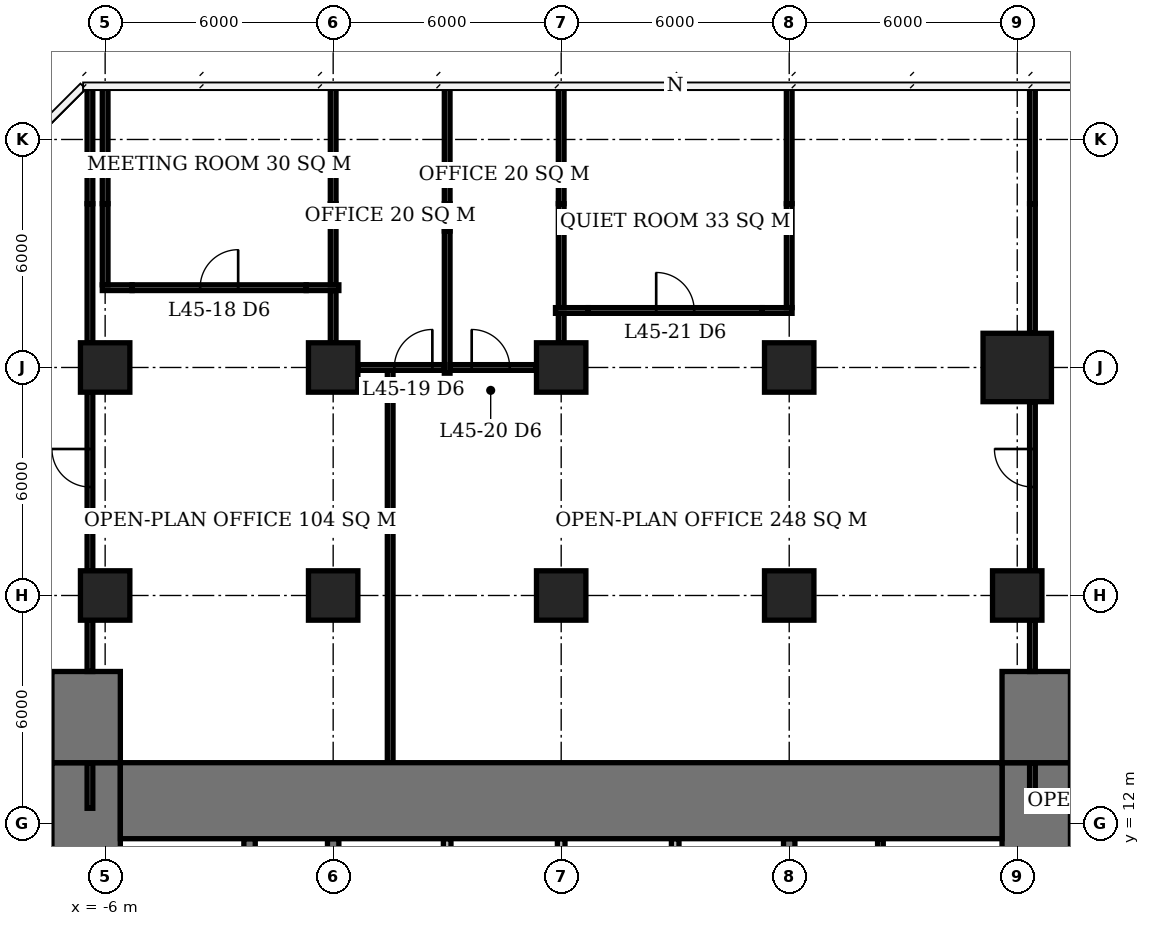
"""IFC4 building model, lengths in metres.
Left out: names, types, materials, properties, quantities, classifications, styles, units other than length and angle.
Written with IfcOpenShell. Run it as: python <this file> out.ifc"""

import sys

from ifc_helpers import new_model, si_unit, direction, frame, frame_2d, origin, origin_2d, place, context, subcontext, project, spatial, rectangle, extrude, element, fill, save


model = new_model("IFC4")
c1 = context("Model", 3, precision=1e-05, world=origin(), true_north=direction((0.0, 1.0)))
c2 = subcontext(c1, "Body", "Model", "MODEL_VIEW")
j1 = project(units=[si_unit("LENGTHUNIT", "METRE"), si_unit("PLANEANGLEUNIT", "RADIAN")], contexts=[c1])
p1 = place(None, origin())
s1 = spatial("IfcSite", under=j1, at=p1, CompositionType="ELEMENT")
p2 = place(p1, origin())
s2 = spatial("IfcBuilding", under=s1, at=p2, CompositionType="ELEMENT")
p3 = place(p2, frame((0.0, 0.0, 185.0)))
s3 = spatial("IfcBuildingStorey", under=s2, at=p3, CompositionType="ELEMENT", Elevation=185.0)
for number, where, z_axis, x_axis in (
    (1, (-6.0, 18.0, 0.0), (0.0, 0.0, 1.0), (1.0, 0.0, 0.0)),
    (2, (-6.0, 24.0, 0.0), (0.0, 0.0, 1.0), (1.0, 0.0, 0.0)),
    (3, (0.0, 18.0, 0.0), (0.0, 0.0, 1.0), (1.0, 0.0, 0.0)),
    (4, (0.0, 24.0, 0.0), (0.0, 0.0, 1.0), (1.0, 0.0, 0.0)),
    (5, (6.0, 18.0, 0.0), (0.0, 0.0, 1.0), (1.0, 0.0, 0.0)),
    (6, (6.0, 24.0, 0.0), (0.0, 0.0, 1.0), (1.0, 0.0, 0.0)),
    (7, (12.0, 18.0, 0.0), (0.0, 0.0, 1.0), (1.0, 0.0, 0.0)),
    (8, (12.0, 24.0, 0.0), (0.0, 0.0, 1.0), (1.0, 0.0, 0.0)),
    (9, (18.0, 18.0, 0.0), (0.0, 0.0, 1.0), (1.0, 0.0, 0.0)),
):
    element("IfcColumn", number, at=place(p3, frame(where, z_axis=z_axis, x_axis=x_axis)), inside=s3, PredefinedType="COLUMN", context=c2, shape_type="SweptSolid", body=[
        extrude(rectangle(XDim=1.3, YDim=1.3, at=origin_2d()), origin(), (0.0, 0.0, 1.0), 3.9),
    ])
p4 = place(p3, frame((18.0, 24.0, 0.0), z_axis=(0.0, 0.0, 1.0), x_axis=(1.0, 0.0, 0.0)))
e10 = element("IfcColumn", 10, at=p4, inside=s3, PredefinedType="COLUMN", context=c2, shape_type="SweptSolid", body=[
    extrude(rectangle(XDim=1.8, YDim=1.8, at=origin_2d()), origin(), (0.0, 0.0, 1.0), 3.9),
])
p5 = place(p3, frame((-5.6, 12.6, 0.0), z_axis=(0.0, 0.0, 1.0), x_axis=(1.0, 0.0, 0.0)))
e11 = element("IfcWall", 11, at=p5, inside=s3, PredefinedType="SHEAR", context=c2, shape_type="SweptSolid", body=[
    extrude(rectangle(XDim=23.2, YDim=2.0, at=frame_2d((11.6, 0.0))), origin(), (0.0, 0.0, 1.0), 3.9),
])
p6 = place(p3, frame((-6.5, -7.6, 0.0), z_axis=(0.0, 0.0, 1.0), x_axis=(0.0, 1.0, 0.0)))
e12 = element("IfcWall", 12, at=p6, inside=s3, PredefinedType="SHEAR", context=c2, shape_type="SweptSolid", body=[
    extrude(rectangle(XDim=21.2, YDim=1.8, at=frame_2d((10.6, 0.0))), origin(), (0.0, 0.0, 1.0), 3.9),
])
p7 = place(p6, frame((7.8, 0.0, 0.0)))
e13 = element("IfcOpeningElement", 13, at=p7, cuts=e12, PredefinedType="OPENING", context=c2, shape_type="SweptSolid", body=[
    extrude(rectangle(XDim=1.8, YDim=2.4, at=frame_2d((0.9, 1.2))), frame((0.0, 0.91, 0.0), z_axis=(0.0, -1.0, 0.0), x_axis=(1.0, 0.0, 0.0)), (0.0, 0.0, 1.0), 1.82),
])
p8 = place(p3, frame((18.5, -7.6, 0.0), z_axis=(0.0, 0.0, 1.0), x_axis=(0.0, 1.0, 0.0)))
e14 = element("IfcWall", 14, at=p8, inside=s3, PredefinedType="SHEAR", context=c2, shape_type="SweptSolid", body=[
    extrude(rectangle(XDim=21.2, YDim=1.8, at=frame_2d((10.6, 0.0))), origin(), (0.0, 0.0, 1.0), 3.9),
])
p9 = place(p8, frame((9.2, 0.0, 0.0)))
e15 = element("IfcOpeningElement", 15, at=p9, cuts=e14, PredefinedType="OPENING", context=c2, shape_type="SweptSolid", body=[
    extrude(rectangle(XDim=1.8, YDim=2.4, at=frame_2d((0.9, 1.2))), frame((0.0, 0.91, 0.0), z_axis=(0.0, -1.0, 0.0), x_axis=(1.0, 0.0, 0.0)), (0.0, 0.0, 1.0), 1.82),
])
for number, where, z_axis, x_axis in (
    (16, (-6.5, 13.6, 0.0), (0.0, 0.0, 1.0), (0.0, 1.0, 0.0)),
    (17, (18.5, 13.6, 0.0), (0.0, 0.0, 1.0), (0.0, 1.0, 0.0)),
):
    element("IfcWall", number, at=place(p3, frame(where, z_axis=z_axis, x_axis=x_axis)), inside=s3, PredefinedType="SHEAR", context=c2, shape_type="SweptSolid", body=[
        extrude(rectangle(XDim=2.4, YDim=1.8, at=frame_2d((1.2, 0.0))), origin(), (0.0, 0.0, 1.0), 3.9),
    ])
p10 = place(p3, frame((0.0, 3.15, 0.0), z_axis=(0.0, 0.0, 1.0), x_axis=(0.0, 1.0, 0.0)))
e18 = element("IfcWall", 18, at=p10, inside=s3, PredefinedType="SHEAR", context=c2, shape_type="SweptSolid", body=[
    extrude(rectangle(XDim=8.45, YDim=0.3, at=frame_2d((4.225, 0.0))), origin(), (0.0, 0.0, 1.0), 3.9),
])
p11 = place(p3, frame((12.0, 6.15, 0.0), z_axis=(0.0, 0.0, 1.0), x_axis=(0.0, 1.0, 0.0)))
e19 = element("IfcWall", 19, at=p11, inside=s3, PredefinedType="SHEAR", context=c2, shape_type="SweptSolid", body=[
    extrude(rectangle(XDim=5.45, YDim=0.3, at=frame_2d((2.725, 0.0))), origin(), (0.0, 0.0, 1.0), 3.9),
])
p12 = place(p3, frame((-2.2, 3.15, 0.0), z_axis=(0.0, 0.0, 1.0), x_axis=(0.0, 1.0, 0.0)))
e20 = element("IfcWall", 20, at=p12, inside=s3, PredefinedType="SHEAR", context=c2, shape_type="SweptSolid", body=[
    extrude(rectangle(XDim=8.45, YDim=0.3, at=frame_2d((4.225, 0.0))), origin(), (0.0, 0.0, 1.0), 3.9),
])
for number, where, z_axis, x_axis in (
    (21, (3.0, 6.15, 0.0), (0.0, 0.0, 1.0), (0.0, 1.0, 0.0)),
    (22, (6.0, 6.15, 0.0), (0.0, 0.0, 1.0), (0.0, 1.0, 0.0)),
    (23, (9.0, 6.15, 0.0), (0.0, 0.0, 1.0), (0.0, 1.0, 0.0)),
):
    element("IfcWall", number, at=place(p3, frame(where, z_axis=z_axis, x_axis=x_axis)), inside=s3, PredefinedType="SOLIDWALL", context=c2, shape_type="SweptSolid", body=[
        extrude(rectangle(XDim=5.45, YDim=0.2, at=frame_2d((2.725, 0.0))), origin(), (0.0, 0.0, 1.0), 3.9),
    ])
p13 = place(p3, frame((14.4, 6.15, 0.0), z_axis=(0.0, 0.0, 1.0), x_axis=(0.0, 1.0, 0.0)))
e24 = element("IfcWall", 24, at=p13, inside=s3, PredefinedType="PLUMBINGWALL", context=c2, shape_type="SweptSolid", body=[
    extrude(rectangle(XDim=5.45, YDim=0.15, at=frame_2d((2.725, 0.0))), origin(), (0.0, 0.0, 1.0), 3.65),
])
p14 = place(p3, frame((0.66, 24.0, 0.0), z_axis=(0.0, 0.0, 1.0), x_axis=(1.0, 0.0, 0.0)))
e25 = element("IfcWall", 25, at=p14, inside=s3, PredefinedType="PARTITIONING", context=c2, shape_type="SweptSolid", body=[
    extrude(rectangle(XDim=2.265, YDim=0.15, at=frame_2d((1.133, 0.0))), origin(), (0.0, 0.0, 1.0), 3.65),
])
p15 = place(p14, frame((0.95, 0.0, 0.0)))
e26 = element("IfcOpeningElement", 26, at=p15, cuts=e25, PredefinedType="OPENING", context=c2, shape_type="SweptSolid", body=[
    extrude(rectangle(XDim=1.0, YDim=2.1, at=frame_2d((0.5, 1.05))), frame((0.0, 0.085, 0.0), z_axis=(0.0, -1.0, 0.0), x_axis=(1.0, 0.0, 0.0)), (0.0, 0.0, 1.0), 0.17),
])
p16 = place(p3, frame((3.075, 24.0, 0.0), z_axis=(0.0, 0.0, 1.0), x_axis=(1.0, 0.0, 0.0)))
e27 = element("IfcWall", 27, at=p16, inside=s3, PredefinedType="PARTITIONING", context=c2, shape_type="SweptSolid", body=[
    extrude(rectangle(XDim=2.265, YDim=0.15, at=frame_2d((1.133, 0.0))), origin(), (0.0, 0.0, 1.0), 3.65),
])
p17 = place(p16, frame((0.57, 0.0, 0.0)))
e28 = element("IfcOpeningElement", 28, at=p17, cuts=e27, PredefinedType="OPENING", context=c2, shape_type="SweptSolid", body=[
    extrude(rectangle(XDim=1.0, YDim=2.1, at=frame_2d((0.5, 1.05))), frame((0.0, 0.085, 0.0), z_axis=(0.0, -1.0, 0.0), x_axis=(1.0, 0.0, 0.0)), (0.0, 0.0, 1.0), 0.17),
])
p18 = place(p3, frame((5.85, 25.5, 0.0), z_axis=(0.0, 0.0, 1.0), x_axis=(1.0, 0.0, 0.0)))
e29 = element("IfcWall", 29, at=p18, inside=s3, PredefinedType="PARTITIONING", context=c2, shape_type="SweptSolid", body=[
    extrude(rectangle(XDim=0.86, YDim=0.15, at=frame_2d((0.43, 0.0))), origin(), (0.0, 0.0, 1.0), 2.65),
])
p19 = place(p3, frame((6.71, 25.5, 0.0), z_axis=(0.0, 0.0, 1.0), x_axis=(1.0, 0.0, 0.0)))
e30 = element("IfcWall", 30, at=p19, inside=s3, PredefinedType="PARTITIONING", context=c2, shape_type="SweptSolid", body=[
    extrude(rectangle(XDim=4.58, YDim=0.15, at=frame_2d((2.29, 0.0))), origin(), (0.0, 0.0, 1.0), 3.65),
])
p20 = place(p19, frame((1.79, 0.0, 0.0)))
e31 = element("IfcOpeningElement", 31, at=p20, cuts=e30, PredefinedType="OPENING", context=c2, shape_type="SweptSolid", body=[
    extrude(rectangle(XDim=1.0, YDim=2.1, at=frame_2d((0.5, 1.05))), frame((0.0, 0.085, 0.0), z_axis=(0.0, -1.0, 0.0), x_axis=(1.0, 0.0, 0.0)), (0.0, 0.0, 1.0), 0.17),
])
for number, where, z_axis, x_axis in (
    (32, (11.29, 25.5, 0.0), (0.0, 0.0, 1.0), (1.0, 0.0, 0.0)),
    (33, (-6.075, 26.1, 0.0), (0.0, 0.0, 1.0), (1.0, 0.0, 0.0)),
):
    element("IfcWall", number, at=place(p3, frame(where, z_axis=z_axis, x_axis=x_axis)), inside=s3, PredefinedType="PARTITIONING", context=c2, shape_type="SweptSolid", body=[
        extrude(rectangle(XDim=0.785, YDim=0.15, at=frame_2d((0.393, 0.0))), origin(), (0.0, 0.0, 1.0), 2.65),
    ])
p21 = place(p3, frame((-5.29, 26.1, 0.0), z_axis=(0.0, 0.0, 1.0), x_axis=(1.0, 0.0, 0.0)))
e34 = element("IfcWall", 34, at=p21, inside=s3, PredefinedType="PARTITIONING", context=c2, shape_type="SweptSolid", body=[
    extrude(rectangle(XDim=4.58, YDim=0.15, at=frame_2d((2.29, 0.0))), origin(), (0.0, 0.0, 1.0), 3.65),
])
p22 = place(p21, frame((1.79, 0.0, 0.0)))
e35 = element("IfcOpeningElement", 35, at=p22, cuts=e34, PredefinedType="OPENING", context=c2, shape_type="SweptSolid", body=[
    extrude(rectangle(XDim=1.0, YDim=2.1, at=frame_2d((0.5, 1.05))), frame((0.0, 0.085, 0.0), z_axis=(0.0, -1.0, 0.0), x_axis=(1.0, 0.0, 0.0)), (0.0, 0.0, 1.0), 0.17),
])
p23 = place(p3, frame((-0.71, 26.1, 0.0), z_axis=(0.0, 0.0, 1.0), x_axis=(1.0, 0.0, 0.0)))
e36 = element("IfcWall", 36, at=p23, inside=s3, PredefinedType="PARTITIONING", context=c2, shape_type="SweptSolid", body=[
    extrude(rectangle(XDim=0.86, YDim=0.15, at=frame_2d((0.43, 0.0))), origin(), (0.0, 0.0, 1.0), 2.65),
])
p24 = place(p3, frame((-6.0, 26.175, 0.0), z_axis=(0.0, 0.0, 1.0), x_axis=(0.0, 1.0, 0.0)))
e37 = element("IfcWall", 37, at=p24, inside=s3, PredefinedType="PARTITIONING", context=c2, shape_type="SweptSolid", body=[
    extrude(rectangle(XDim=2.135, YDim=0.15, at=frame_2d((1.067, 0.0))), origin(), (0.0, 0.0, 1.0), 2.65),
])
p25 = place(p3, frame((-6.0, 28.31, 0.0), z_axis=(0.0, 0.0, 1.0), x_axis=(0.0, 1.0, 0.0)))
e38 = element("IfcWall", 38, at=p25, inside=s3, PredefinedType="PARTITIONING", context=c2, shape_type="SweptSolid", body=[
    extrude(rectangle(XDim=3.09, YDim=0.15, at=frame_2d((1.545, 0.0))), origin(), (0.0, 0.0, 1.0), 3.65),
])
p26 = place(p3, frame((0.0, 24.65, 0.0), z_axis=(0.0, 0.0, 1.0), x_axis=(0.0, 1.0, 0.0)))
e39 = element("IfcWall", 39, at=p26, inside=s3, PredefinedType="PARTITIONING", context=c2, shape_type="SweptSolid", body=[
    extrude(rectangle(XDim=1.375, YDim=0.15, at=frame_2d((0.688, 0.0))), origin(), (0.0, 0.0, 1.0), 2.65),
])
p27 = place(p3, frame((0.0, 26.175, 0.0), z_axis=(0.0, 0.0, 1.0), x_axis=(0.0, 1.0, 0.0)))
e40 = element("IfcWall", 40, at=p27, inside=s3, PredefinedType="PARTITIONING", context=c2, shape_type="SweptSolid", body=[
    extrude(rectangle(XDim=2.135, YDim=0.15, at=frame_2d((1.067, 0.0))), origin(), (0.0, 0.0, 1.0), 2.65),
])
p28 = place(p3, frame((0.0, 28.31, 0.0), z_axis=(0.0, 0.0, 1.0), x_axis=(0.0, 1.0, 0.0)))
e41 = element("IfcWall", 41, at=p28, inside=s3, PredefinedType="PARTITIONING", context=c2, shape_type="SweptSolid", body=[
    extrude(rectangle(XDim=3.09, YDim=0.15, at=frame_2d((1.545, 0.0))), origin(), (0.0, 0.0, 1.0), 3.65),
])
p29 = place(p3, frame((3.0, 23.85, 0.0), z_axis=(0.0, 0.0, 1.0), x_axis=(0.0, 1.0, 0.0)))
e42 = element("IfcWall", 42, at=p29, inside=s3, PredefinedType="PARTITIONING", context=c2, shape_type="SweptSolid", body=[
    extrude(rectangle(XDim=3.74, YDim=0.15, at=frame_2d((1.87, 0.0))), origin(), (0.0, 0.0, 1.0), 3.65),
])
p30 = place(p3, frame((3.0, 27.59, 0.0), z_axis=(0.0, 0.0, 1.0), x_axis=(0.0, 1.0, 0.0)))
e43 = element("IfcWall", 43, at=p30, inside=s3, PredefinedType="PARTITIONING", context=c2, shape_type="SweptSolid", body=[
    extrude(rectangle(XDim=0.72, YDim=0.15, at=frame_2d((0.36, 0.0))), origin(), (0.0, 0.0, 1.0), 2.65),
])
p31 = place(p3, frame((3.0, 28.31, 0.0), z_axis=(0.0, 0.0, 1.0), x_axis=(0.0, 1.0, 0.0)))
e44 = element("IfcWall", 44, at=p31, inside=s3, PredefinedType="PARTITIONING", context=c2, shape_type="SweptSolid", body=[
    extrude(rectangle(XDim=3.09, YDim=0.15, at=frame_2d((1.545, 0.0))), origin(), (0.0, 0.0, 1.0), 3.65),
])
p32 = place(p3, frame((6.0, 24.65, 0.0), z_axis=(0.0, 0.0, 1.0), x_axis=(0.0, 1.0, 0.0)))
e45 = element("IfcWall", 45, at=p32, inside=s3, PredefinedType="PARTITIONING", context=c2, shape_type="SweptSolid", body=[
    extrude(rectangle(XDim=0.775, YDim=0.15, at=frame_2d((0.388, 0.0))), origin(), (0.0, 0.0, 1.0), 2.65),
])
p33 = place(p3, frame((6.0, 25.575, 0.0), z_axis=(0.0, 0.0, 1.0), x_axis=(0.0, 1.0, 0.0)))
e46 = element("IfcWall", 46, at=p33, inside=s3, PredefinedType="PARTITIONING", context=c2, shape_type="SweptSolid", body=[
    extrude(rectangle(XDim=2.735, YDim=0.15, at=frame_2d((1.368, 0.0))), origin(), (0.0, 0.0, 1.0), 2.65),
])
p34 = place(p3, frame((6.0, 28.31, 0.0), z_axis=(0.0, 0.0, 1.0), x_axis=(0.0, 1.0, 0.0)))
e47 = element("IfcWall", 47, at=p34, inside=s3, PredefinedType="PARTITIONING", context=c2, shape_type="SweptSolid", body=[
    extrude(rectangle(XDim=3.04, YDim=0.15, at=frame_2d((1.52, 0.0))), origin(), (0.0, 0.0, 1.0), 3.65),
])
p35 = place(p3, frame((12.0, 25.575, 0.0), z_axis=(0.0, 0.0, 1.0), x_axis=(0.0, 1.0, 0.0)))
e48 = element("IfcWall", 48, at=p35, inside=s3, PredefinedType="PARTITIONING", context=c2, shape_type="SweptSolid", body=[
    extrude(rectangle(XDim=2.735, YDim=0.15, at=frame_2d((1.368, 0.0))), origin(), (0.0, 0.0, 1.0), 2.65),
])
p36 = place(p3, frame((12.0, 28.31, 0.0), z_axis=(0.0, 0.0, 1.0), x_axis=(0.0, 1.0, 0.0)))
e49 = element("IfcWall", 49, at=p36, inside=s3, PredefinedType="PARTITIONING", context=c2, shape_type="SweptSolid", body=[
    extrude(rectangle(XDim=3.04, YDim=0.15, at=frame_2d((1.52, 0.0))), origin(), (0.0, 0.0, 1.0), 3.65),
])
p37 = place(p3, frame((-6.4, 12.4, 0.0), z_axis=(0.0, 0.0, 1.0), x_axis=(0.0, 1.0, 0.0)))
e50 = element("IfcWall", 50, at=p37, inside=s3, PredefinedType="PARTITIONING", context=c2, shape_type="SweptSolid", body=[
    extrude(rectangle(XDim=1.2, YDim=0.15, at=frame_2d((0.6, 0.0))), origin(), (0.0, 0.0, 1.0), 3.65),
])
p38 = place(p3, frame((-6.4, 16.0, 0.0), z_axis=(0.0, 0.0, 1.0), x_axis=(0.0, 1.0, 0.0)))
e51 = element("IfcWall", 51, at=p38, inside=s3, PredefinedType="PARTITIONING", context=c2, shape_type="SweptSolid", body=[
    extrude(rectangle(XDim=1.35, YDim=0.15, at=frame_2d((0.675, 0.0))), origin(), (0.0, 0.0, 1.0), 3.65),
])
p39 = place(p3, frame((-6.4, 18.65, 0.0), z_axis=(0.0, 0.0, 1.0), x_axis=(0.0, 1.0, 0.0)))
e52 = element("IfcWall", 52, at=p39, inside=s3, PredefinedType="PARTITIONING", context=c2, shape_type="SweptSolid", body=[
    extrude(rectangle(XDim=4.7, YDim=0.15, at=frame_2d((2.35, 0.0))), origin(), (0.0, 0.0, 1.0), 3.65),
])
p40 = place(p39, frame((2.205, 0.0, 0.0)))
e53 = element("IfcOpeningElement", 53, at=p40, cuts=e52, PredefinedType="OPENING", context=c2, shape_type="SweptSolid", body=[
    extrude(rectangle(XDim=1.0, YDim=2.1, at=frame_2d((0.5, 1.05))), frame((0.0, 0.085, 0.0), z_axis=(0.0, -1.0, 0.0), x_axis=(1.0, 0.0, 0.0)), (0.0, 0.0, 1.0), 0.17),
])
p41 = place(p3, frame((-6.4, 24.65, 0.0), z_axis=(0.0, 0.0, 1.0), x_axis=(0.0, 1.0, 0.0)))
e54 = element("IfcWall", 54, at=p41, inside=s3, PredefinedType="PARTITIONING", context=c2, shape_type="SweptSolid", body=[
    extrude(rectangle(XDim=3.66, YDim=0.15, at=frame_2d((1.83, 0.0))), origin(), (0.0, 0.0, 1.0), 2.65),
])
p42 = place(p3, frame((-6.4, 28.31, 0.0), z_axis=(0.0, 0.0, 1.0), x_axis=(0.0, 1.0, 0.0)))
e55 = element("IfcWall", 55, at=p42, inside=s3, PredefinedType="PARTITIONING", context=c2, shape_type="SweptSolid", body=[
    extrude(rectangle(XDim=3.09, YDim=0.15, at=frame_2d((1.545, 0.0))), origin(), (0.0, 0.0, 1.0), 3.65),
])
p43 = place(p3, frame((1.5, 12.4, 0.0), z_axis=(0.0, 0.0, 1.0), x_axis=(0.0, 1.0, 0.0)))
e56 = element("IfcWall", 56, at=p43, inside=s3, PredefinedType="PARTITIONING", context=c2, shape_type="SweptSolid", body=[
    extrude(rectangle(XDim=11.525, YDim=0.15, at=frame_2d((5.763, 0.0))), origin(), (0.0, 0.0, 1.0), 3.65),
])
p44 = place(p3, frame((18.4, 12.4, 0.0), z_axis=(0.0, 0.0, 1.0), x_axis=(0.0, 1.0, 0.0)))
e57 = element("IfcWall", 57, at=p44, inside=s3, PredefinedType="PARTITIONING", context=c2, shape_type="SweptSolid", body=[
    extrude(rectangle(XDim=1.2, YDim=0.15, at=frame_2d((0.6, 0.0))), origin(), (0.0, 0.0, 1.0), 3.65),
])
p45 = place(p3, frame((18.4, 16.0, 0.0), z_axis=(0.0, 0.0, 1.0), x_axis=(0.0, 1.0, 0.0)))
e58 = element("IfcWall", 58, at=p45, inside=s3, PredefinedType="PARTITIONING", context=c2, shape_type="SweptSolid", body=[
    extrude(rectangle(XDim=1.35, YDim=0.15, at=frame_2d((0.675, 0.0))), origin(), (0.0, 0.0, 1.0), 3.65),
])
p46 = place(p3, frame((18.4, 18.65, 0.0), z_axis=(0.0, 0.0, 1.0), x_axis=(0.0, 1.0, 0.0)))
e59 = element("IfcWall", 59, at=p46, inside=s3, PredefinedType="PARTITIONING", context=c2, shape_type="SweptSolid", body=[
    extrude(rectangle(XDim=4.45, YDim=0.15, at=frame_2d((2.225, 0.0))), origin(), (0.0, 0.0, 1.0), 3.65),
])
p47 = place(p46, frame((2.205, 0.0, 0.0)))
e60 = element("IfcOpeningElement", 60, at=p47, cuts=e59, PredefinedType="OPENING", context=c2, shape_type="SweptSolid", body=[
    extrude(rectangle(XDim=1.0, YDim=2.1, at=frame_2d((0.5, 1.05))), frame((0.0, 0.085, 0.0), z_axis=(0.0, -1.0, 0.0), x_axis=(1.0, 0.0, 0.0)), (0.0, 0.0, 1.0), 0.17),
])
p48 = place(p3, frame((18.4, 24.9, 0.0), z_axis=(0.0, 0.0, 1.0), x_axis=(0.0, 1.0, 0.0)))
e61 = element("IfcWall", 61, at=p48, inside=s3, PredefinedType="PARTITIONING", context=c2, shape_type="SweptSolid", body=[
    extrude(rectangle(XDim=3.41, YDim=0.15, at=frame_2d((1.705, 0.0))), origin(), (0.0, 0.0, 1.0), 2.65),
])
p49 = place(p3, frame((18.4, 28.31, 0.0), z_axis=(0.0, 0.0, 1.0), x_axis=(0.0, 1.0, 0.0)))
e62 = element("IfcWall", 62, at=p49, inside=s3, PredefinedType="PARTITIONING", context=c2, shape_type="SweptSolid", body=[
    extrude(rectangle(XDim=3.04, YDim=0.15, at=frame_2d((1.52, 0.0))), origin(), (0.0, 0.0, 1.0), 3.65),
])
p50 = place(p22, origin())
e63 = element("IfcDoor", 63, at=p50, inside=s3, OperationType="SINGLE_SWING_RIGHT", PredefinedType="DOOR", context=c2, shape_type="SweptSolid", body=[
    extrude(rectangle(XDim=1.0, YDim=2.1, at=frame_2d((0.5, 1.05))), frame((0.0, 0.025, 0.0), z_axis=(0.0, -1.0, 0.0), x_axis=(1.0, 0.0, 0.0)), (0.0, 0.0, 1.0), 0.05),
])
fill(e35, e63)
p51 = place(p15, origin())
e64 = element("IfcDoor", 64, at=p51, inside=s3, OperationType="SINGLE_SWING_RIGHT", PredefinedType="DOOR", context=c2, shape_type="SweptSolid", body=[
    extrude(rectangle(XDim=1.0, YDim=2.1, at=frame_2d((0.5, 1.05))), frame((0.0, 0.025, 0.0), z_axis=(0.0, -1.0, 0.0), x_axis=(1.0, 0.0, 0.0)), (0.0, 0.0, 1.0), 0.05),
])
fill(e26, e64)
p52 = place(p17, origin())
e65 = element("IfcDoor", 65, at=p52, inside=s3, OperationType="SINGLE_SWING_LEFT", PredefinedType="DOOR", context=c2, shape_type="SweptSolid", body=[
    extrude(rectangle(XDim=1.0, YDim=2.1, at=frame_2d((0.5, 1.05))), frame((0.0, 0.025, 0.0), z_axis=(0.0, -1.0, 0.0), x_axis=(1.0, 0.0, 0.0)), (0.0, 0.0, 1.0), 0.05),
])
fill(e28, e65)
p53 = place(p20, origin())
e66 = element("IfcDoor", 66, at=p53, inside=s3, OperationType="SINGLE_SWING_LEFT", PredefinedType="DOOR", context=c2, shape_type="SweptSolid", body=[
    extrude(rectangle(XDim=1.0, YDim=2.1, at=frame_2d((0.5, 1.05))), frame((0.0, 0.025, 0.0), z_axis=(0.0, -1.0, 0.0), x_axis=(1.0, 0.0, 0.0)), (0.0, 0.0, 1.0), 0.05),
])
fill(e31, e66)
p54 = place(p40, origin())
e67 = element("IfcDoor", 67, at=p54, inside=s3, OperationType="SINGLE_SWING_RIGHT", PredefinedType="DOOR", context=c2, shape_type="SweptSolid", body=[
    extrude(rectangle(XDim=1.0, YDim=2.1, at=frame_2d((0.5, 1.05))), frame((0.0, 0.025, 0.0), z_axis=(0.0, -1.0, 0.0), x_axis=(1.0, 0.0, 0.0)), (0.0, 0.0, 1.0), 0.05),
])
fill(e53, e67)
p55 = place(p47, origin())
e68 = element("IfcDoor", 68, at=p55, inside=s3, OperationType="SINGLE_SWING_RIGHT", PredefinedType="DOOR", context=c2, shape_type="SweptSolid", body=[
    extrude(rectangle(XDim=1.0, YDim=2.1, at=frame_2d((0.5, 1.05))), frame((0.0, 0.025, 0.0), z_axis=(0.0, -1.0, 0.0), x_axis=(1.0, 0.0, 0.0)), (0.0, 0.0, 1.0), 0.05),
])
fill(e60, e68)
save(model, sys.argv[1])
